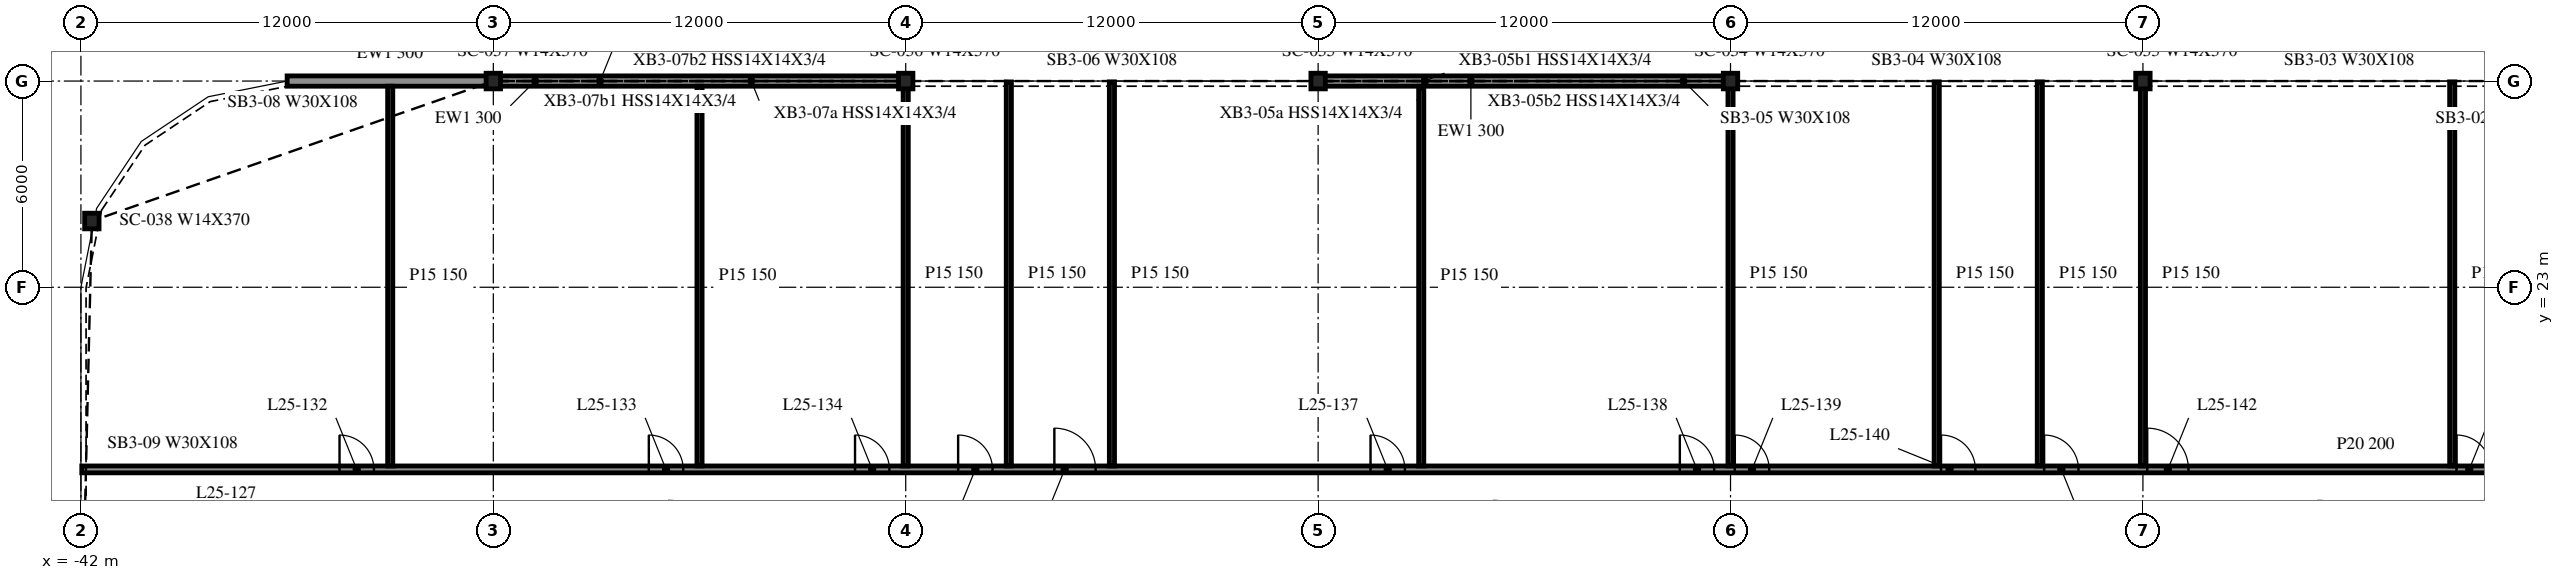
"""IFC4 building model, lengths in metres.
Left out: names, types, materials, properties, quantities, classifications, styles, units other than length and angle.
Written with IfcOpenShell. Run it as: python <this file> out.ifc"""

import sys

from ifc_helpers import new_model, si_unit, direction, frame, frame_2d, origin, origin_2d, place, context, subcontext, project, spatial, rectangle, i_section, extrude, element, fill, save


model = new_model("IFC4")
c1 = context("Model", 3, precision=1e-05, world=origin(), true_north=direction((0.0, 1.0)))
c2 = subcontext(c1, "Body", "Model", "MODEL_VIEW")
j1 = project(units=[si_unit("LENGTHUNIT", "METRE"), si_unit("PLANEANGLEUNIT", "RADIAN")], contexts=[c1])
p1 = place(None, origin())
s1 = spatial("IfcSite", under=j1, at=p1, CompositionType="ELEMENT")
p2 = place(p1, origin())
s2 = spatial("IfcBuilding", under=s1, at=p2, CompositionType="ELEMENT")
p3 = place(p2, frame((0.0, 0.0, 109.4)))
s3 = spatial("IfcBuildingStorey", under=s2, at=p3, CompositionType="ELEMENT", Elevation=109.4)
for number, where, z_axis, x_axis in (
    (1, (18.0, 29.0, -0.34), (0.0, 0.0, 1.0), (1.0, 0.0, 0.0)),
    (2, (6.0, 29.0, -0.34), (0.0, 0.0, 1.0), (1.0, 0.0, 0.0)),
    (3, (-6.0, 29.0, -0.34), (0.0, 0.0, 1.0), (1.0, 0.0, 0.0)),
    (4, (-18.0, 29.0, -0.34), (0.0, 0.0, 1.0), (1.0, 0.0, 0.0)),
    (5, (-30.0, 29.0, -0.34), (0.0, 0.0, 1.0), (1.0, 0.0, 0.0)),
    (6, (-41.682, 24.927, -0.34), (0.0, 0.0, 1.0), (1.0, 0.0, 0.0)),
):
    element("IfcColumn", number, at=place(p3, frame(where, z_axis=z_axis, x_axis=x_axis)), inside=s3, PredefinedType="COLUMN", context=c2, shape_type="SweptSolid", body=[
        extrude(i_section(OverallWidth=0.419, OverallDepth=0.455, WebThickness=0.042, FlangeThickness=0.068, at=origin_2d()), origin(), (0.0, 0.0, 1.0), 4.1),
    ])
for number, where, z_axis, x_axis in (
    (7, (5.979, 29.0, 0.0), (0.0, 0.0, 1.0), (-1.0, 0.0, 0.0)),
    (8, (-18.021, 29.0, 0.0), (0.0, 0.0, 1.0), (-1.0, 0.0, 0.0)),
):
    element("IfcWall", number, at=place(p3, frame(where, z_axis=z_axis, x_axis=x_axis)), inside=s3, PredefinedType="NOTDEFINED", context=c2, shape_type="SweptSolid", body=[
        extrude(rectangle(XDim=11.958, YDim=0.3, at=frame_2d((5.979, 0.0))), origin(), (0.0, 0.0, 1.0), 3.003),
    ])
p4 = place(p3, frame((-30.021, 29.0, 0.0), z_axis=(0.0, 0.0, 1.0), x_axis=(-1.0, 0.0, 0.0)))
e9 = element("IfcWall", 9, at=p4, inside=s3, PredefinedType="NOTDEFINED", context=c2, shape_type="SweptSolid", body=[
    extrude(rectangle(XDim=5.979, YDim=0.3, at=frame_2d((2.99, 0.0))), origin(), (0.0, 0.0, 1.0), 3.003),
])
p5 = place(p3, frame((-41.975, 17.7, 0.0), z_axis=(0.0, 0.0, 1.0), x_axis=(1.0, 0.0, 0.0)))
e10 = element("IfcWall", 10, at=p5, inside=s3, PredefinedType="PARTITIONING", context=c2, shape_type="SweptSolid", body=[
    extrude(rectangle(XDim=95.95, YDim=0.2, at=frame_2d((47.975, 0.0))), origin(), (0.0, 0.0, 1.0), 3.76),
])
p6 = place(p5, frame((7.5, 0.0, 0.0)))
e11 = element("IfcOpeningElement", 11, at=p6, cuts=e10, PredefinedType="OPENING", context=c2, shape_type="SweptSolid", body=[
    extrude(rectangle(XDim=1.0, YDim=2.1, at=frame_2d((0.5, 1.05))), frame((0.0, 0.11, 0.0), z_axis=(0.0, -1.0, 0.0), x_axis=(1.0, 0.0, 0.0)), (0.0, 0.0, 1.0), 0.22),
])
p7 = place(p5, frame((16.5, 0.0, 0.0)))
e12 = element("IfcOpeningElement", 12, at=p7, cuts=e10, PredefinedType="OPENING", context=c2, shape_type="SweptSolid", body=[
    extrude(rectangle(XDim=1.0, YDim=2.1, at=frame_2d((0.5, 1.05))), frame((0.0, 0.11, 0.0), z_axis=(0.0, -1.0, 0.0), x_axis=(1.0, 0.0, 0.0)), (0.0, 0.0, 1.0), 0.22),
])
p8 = place(p5, frame((22.5, 0.0, 0.0)))
e13 = element("IfcOpeningElement", 13, at=p8, cuts=e10, PredefinedType="OPENING", context=c2, shape_type="SweptSolid", body=[
    extrude(rectangle(XDim=1.0, YDim=2.1, at=frame_2d((0.5, 1.05))), frame((0.0, 0.11, 0.0), z_axis=(0.0, -1.0, 0.0), x_axis=(1.0, 0.0, 0.0)), (0.0, 0.0, 1.0), 0.22),
])
p9 = place(p5, frame((25.5, 0.0, 0.0)))
e14 = element("IfcOpeningElement", 14, at=p9, cuts=e10, PredefinedType="OPENING", context=c2, shape_type="SweptSolid", body=[
    extrude(rectangle(XDim=1.0, YDim=2.1, at=frame_2d((0.5, 1.05))), frame((0.0, 0.11, 0.0), z_axis=(0.0, -1.0, 0.0), x_axis=(1.0, 0.0, 0.0)), (0.0, 0.0, 1.0), 0.22),
])
p10 = place(p5, frame((28.3, 0.0, 0.0)))
e15 = element("IfcOpeningElement", 15, at=p10, cuts=e10, PredefinedType="OPENING", context=c2, shape_type="SweptSolid", body=[
    extrude(rectangle(XDim=1.2, YDim=2.1, at=frame_2d((0.6, 1.05))), frame((0.0, 0.11, 0.0), z_axis=(0.0, -1.0, 0.0), x_axis=(1.0, 0.0, 0.0)), (0.0, 0.0, 1.0), 0.22),
])
p11 = place(p5, frame((37.5, 0.0, 0.0)))
e16 = element("IfcOpeningElement", 16, at=p11, cuts=e10, PredefinedType="OPENING", context=c2, shape_type="SweptSolid", body=[
    extrude(rectangle(XDim=1.0, YDim=2.1, at=frame_2d((0.5, 1.05))), frame((0.0, 0.11, 0.0), z_axis=(0.0, -1.0, 0.0), x_axis=(1.0, 0.0, 0.0)), (0.0, 0.0, 1.0), 0.22),
])
p12 = place(p5, frame((46.5, 0.0, 0.0)))
e17 = element("IfcOpeningElement", 17, at=p12, cuts=e10, PredefinedType="OPENING", context=c2, shape_type="SweptSolid", body=[
    extrude(rectangle(XDim=1.0, YDim=2.1, at=frame_2d((0.5, 1.05))), frame((0.0, 0.11, 0.0), z_axis=(0.0, -1.0, 0.0), x_axis=(1.0, 0.0, 0.0)), (0.0, 0.0, 1.0), 0.22),
])
p13 = place(p5, frame((48.1, 0.0, 0.0)))
e18 = element("IfcOpeningElement", 18, at=p13, cuts=e10, PredefinedType="OPENING", context=c2, shape_type="SweptSolid", body=[
    extrude(rectangle(XDim=1.0, YDim=2.1, at=frame_2d((0.5, 1.05))), frame((0.0, 0.11, 0.0), z_axis=(0.0, -1.0, 0.0), x_axis=(1.0, 0.0, 0.0)), (0.0, 0.0, 1.0), 0.22),
])
p14 = place(p5, frame((54.1, 0.0, 0.0)))
e19 = element("IfcOpeningElement", 19, at=p14, cuts=e10, PredefinedType="OPENING", context=c2, shape_type="SweptSolid", body=[
    extrude(rectangle(XDim=1.0, YDim=2.1, at=frame_2d((0.5, 1.05))), frame((0.0, 0.11, 0.0), z_axis=(0.0, -1.0, 0.0), x_axis=(1.0, 0.0, 0.0)), (0.0, 0.0, 1.0), 0.22),
])
p15 = place(p5, frame((57.1, 0.0, 0.0)))
e20 = element("IfcOpeningElement", 20, at=p15, cuts=e10, PredefinedType="OPENING", context=c2, shape_type="SweptSolid", body=[
    extrude(rectangle(XDim=1.0, YDim=2.1, at=frame_2d((0.5, 1.05))), frame((0.0, 0.11, 0.0), z_axis=(0.0, -1.0, 0.0), x_axis=(1.0, 0.0, 0.0)), (0.0, 0.0, 1.0), 0.22),
])
p16 = place(p5, frame((60.1, 0.0, 0.0)))
e21 = element("IfcOpeningElement", 21, at=p16, cuts=e10, PredefinedType="OPENING", context=c2, shape_type="SweptSolid", body=[
    extrude(rectangle(XDim=1.2, YDim=2.1, at=frame_2d((0.6, 1.05))), frame((0.0, 0.11, 0.0), z_axis=(0.0, -1.0, 0.0), x_axis=(1.0, 0.0, 0.0)), (0.0, 0.0, 1.0), 0.22),
])
p17 = place(p5, frame((69.1, 0.0, 0.0)))
e22 = element("IfcOpeningElement", 22, at=p17, cuts=e10, PredefinedType="OPENING", context=c2, shape_type="SweptSolid", body=[
    extrude(rectangle(XDim=1.0, YDim=2.1, at=frame_2d((0.5, 1.05))), frame((0.0, 0.11, 0.0), z_axis=(0.0, -1.0, 0.0), x_axis=(1.0, 0.0, 0.0)), (0.0, 0.0, 1.0), 0.22),
])
p18 = place(p5, frame((78.1, 0.0, 0.0)))
e23 = element("IfcOpeningElement", 23, at=p18, cuts=e10, PredefinedType="OPENING", context=c2, shape_type="SweptSolid", body=[
    extrude(rectangle(XDim=1.0, YDim=2.1, at=frame_2d((0.5, 1.05))), frame((0.0, 0.11, 0.0), z_axis=(0.0, -1.0, 0.0), x_axis=(1.0, 0.0, 0.0)), (0.0, 0.0, 1.0), 0.22),
])
p19 = place(p5, frame((84.1, 0.0, 0.0)))
e24 = element("IfcOpeningElement", 24, at=p19, cuts=e10, PredefinedType="OPENING", context=c2, shape_type="SweptSolid", body=[
    extrude(rectangle(XDim=1.0, YDim=2.1, at=frame_2d((0.5, 1.05))), frame((0.0, 0.11, 0.0), z_axis=(0.0, -1.0, 0.0), x_axis=(1.0, 0.0, 0.0)), (0.0, 0.0, 1.0), 0.22),
])
p20 = place(p5, frame((87.1, 0.0, 0.0)))
e25 = element("IfcOpeningElement", 25, at=p20, cuts=e10, PredefinedType="OPENING", context=c2, shape_type="SweptSolid", body=[
    extrude(rectangle(XDim=1.0, YDim=2.1, at=frame_2d((0.5, 1.05))), frame((0.0, 0.11, 0.0), z_axis=(0.0, -1.0, 0.0), x_axis=(1.0, 0.0, 0.0)), (0.0, 0.0, 1.0), 0.22),
])
p21 = place(p5, frame((90.1, 0.0, 0.0)))
e26 = element("IfcOpeningElement", 26, at=p21, cuts=e10, PredefinedType="OPENING", context=c2, shape_type="SweptSolid", body=[
    extrude(rectangle(XDim=1.0, YDim=2.1, at=frame_2d((0.5, 1.05))), frame((0.0, 0.11, 0.0), z_axis=(0.0, -1.0, 0.0), x_axis=(1.0, 0.0, 0.0)), (0.0, 0.0, 1.0), 0.22),
])
for number, where, z_axis, x_axis in (
    (27, (-33.0, 17.8, 0.0), (0.0, 0.0, 1.0), (0.0, 1.0, 0.0)),
    (28, (-24.0, 17.8, 0.0), (0.0, 0.0, 1.0), (0.0, 1.0, 0.0)),
):
    element("IfcWall", number, at=place(p3, frame(where, z_axis=z_axis, x_axis=x_axis)), inside=s3, PredefinedType="PARTITIONING", context=c2, shape_type="SweptSolid", body=[
        extrude(rectangle(XDim=11.05, YDim=0.15, at=frame_2d((5.525, 0.0))), origin(), (0.0, 0.0, 1.0), 3.76),
    ])
for number, where, z_axis, x_axis in (
    (29, (-18.0, 17.8, 0.0), (0.0, 0.0, 1.0), (0.0, 1.0, 0.0)),
    (30, (-15.0, 17.8, 0.0), (0.0, 0.0, 1.0), (0.0, 1.0, 0.0)),
    (31, (-12.0, 17.8, 0.0), (0.0, 0.0, 1.0), (0.0, 1.0, 0.0)),
):
    element("IfcWall", number, at=place(p3, frame(where, z_axis=z_axis, x_axis=x_axis)), inside=s3, PredefinedType="PARTITIONING", context=c2, shape_type="SweptSolid", body=[
        extrude(rectangle(XDim=11.175, YDim=0.15, at=frame_2d((5.587, 0.0))), origin(), (0.0, 0.0, 1.0), 3.76),
    ])
p22 = place(p3, frame((-3.0, 17.8, 0.0), z_axis=(0.0, 0.0, 1.0), x_axis=(0.0, 1.0, 0.0)))
e32 = element("IfcWall", 32, at=p22, inside=s3, PredefinedType="PARTITIONING", context=c2, shape_type="SweptSolid", body=[
    extrude(rectangle(XDim=11.05, YDim=0.15, at=frame_2d((5.525, 0.0))), origin(), (0.0, 0.0, 1.0), 3.76),
])
for number, where, z_axis, x_axis in (
    (33, (6.0, 17.8, 0.0), (0.0, 0.0, 1.0), (0.0, 1.0, 0.0)),
    (34, (12.0, 17.8, 0.0), (0.0, 0.0, 1.0), (0.0, 1.0, 0.0)),
    (35, (15.0, 17.8, 0.0), (0.0, 0.0, 1.0), (0.0, 1.0, 0.0)),
    (36, (18.0, 17.8, 0.0), (0.0, 0.0, 1.0), (0.0, 1.0, 0.0)),
    (37, (27.0, 17.8, 0.0), (0.0, 0.0, 1.0), (0.0, 1.0, 0.0)),
):
    element("IfcWall", number, at=place(p3, frame(where, z_axis=z_axis, x_axis=x_axis)), inside=s3, PredefinedType="PARTITIONING", context=c2, shape_type="SweptSolid", body=[
        extrude(rectangle(XDim=11.175, YDim=0.15, at=frame_2d((5.587, 0.0))), origin(), (0.0, 0.0, 1.0), 3.76),
    ])
p23 = place(p6, origin())
e38 = element("IfcDoor", 38, at=p23, inside=s3, OperationType="SINGLE_SWING_LEFT", PredefinedType="DOOR", context=c2, shape_type="SweptSolid", body=[
    extrude(rectangle(XDim=1.0, YDim=2.1, at=frame_2d((0.5, 1.05))), frame((0.0, 0.025, 0.0), z_axis=(0.0, -1.0, 0.0), x_axis=(1.0, 0.0, 0.0)), (0.0, 0.0, 1.0), 0.05),
])
fill(e11, e38)
p24 = place(p7, origin())
e39 = element("IfcDoor", 39, at=p24, inside=s3, OperationType="SINGLE_SWING_LEFT", PredefinedType="DOOR", context=c2, shape_type="SweptSolid", body=[
    extrude(rectangle(XDim=1.0, YDim=2.1, at=frame_2d((0.5, 1.05))), frame((0.0, 0.025, 0.0), z_axis=(0.0, -1.0, 0.0), x_axis=(1.0, 0.0, 0.0)), (0.0, 0.0, 1.0), 0.05),
])
fill(e12, e39)
p25 = place(p8, origin())
e40 = element("IfcDoor", 40, at=p25, inside=s3, OperationType="SINGLE_SWING_LEFT", PredefinedType="DOOR", context=c2, shape_type="SweptSolid", body=[
    extrude(rectangle(XDim=1.0, YDim=2.1, at=frame_2d((0.5, 1.05))), frame((0.0, 0.025, 0.0), z_axis=(0.0, -1.0, 0.0), x_axis=(1.0, 0.0, 0.0)), (0.0, 0.0, 1.0), 0.05),
])
fill(e13, e40)
p26 = place(p9, origin())
e41 = element("IfcDoor", 41, at=p26, inside=s3, OperationType="SINGLE_SWING_LEFT", PredefinedType="DOOR", context=c2, shape_type="SweptSolid", body=[
    extrude(rectangle(XDim=1.0, YDim=2.1, at=frame_2d((0.5, 1.05))), frame((0.0, 0.025, 0.0), z_axis=(0.0, -1.0, 0.0), x_axis=(1.0, 0.0, 0.0)), (0.0, 0.0, 1.0), 0.05),
])
fill(e14, e41)
p27 = place(p10, origin())
e42 = element("IfcDoor", 42, at=p27, inside=s3, OperationType="SINGLE_SWING_LEFT", PredefinedType="DOOR", context=c2, shape_type="SweptSolid", body=[
    extrude(rectangle(XDim=1.2, YDim=2.1, at=frame_2d((0.6, 1.05))), frame((0.0, 0.025, 0.0), z_axis=(0.0, -1.0, 0.0), x_axis=(1.0, 0.0, 0.0)), (0.0, 0.0, 1.0), 0.05),
])
fill(e15, e42)
p28 = place(p11, origin())
e43 = element("IfcDoor", 43, at=p28, inside=s3, OperationType="SINGLE_SWING_LEFT", PredefinedType="DOOR", context=c2, shape_type="SweptSolid", body=[
    extrude(rectangle(XDim=1.0, YDim=2.1, at=frame_2d((0.5, 1.05))), frame((0.0, 0.025, 0.0), z_axis=(0.0, -1.0, 0.0), x_axis=(1.0, 0.0, 0.0)), (0.0, 0.0, 1.0), 0.05),
])
fill(e16, e43)
p29 = place(p12, origin())
e44 = element("IfcDoor", 44, at=p29, inside=s3, OperationType="SINGLE_SWING_LEFT", PredefinedType="DOOR", context=c2, shape_type="SweptSolid", body=[
    extrude(rectangle(XDim=1.0, YDim=2.1, at=frame_2d((0.5, 1.05))), frame((0.0, 0.025, 0.0), z_axis=(0.0, -1.0, 0.0), x_axis=(1.0, 0.0, 0.0)), (0.0, 0.0, 1.0), 0.05),
])
fill(e17, e44)
p30 = place(p13, origin())
e45 = element("IfcDoor", 45, at=p30, inside=s3, OperationType="SINGLE_SWING_RIGHT", PredefinedType="DOOR", context=c2, shape_type="SweptSolid", body=[
    extrude(rectangle(XDim=1.0, YDim=2.1, at=frame_2d((0.5, 1.05))), frame((0.0, 0.025, 0.0), z_axis=(0.0, -1.0, 0.0), x_axis=(1.0, 0.0, 0.0)), (0.0, 0.0, 1.0), 0.05),
])
fill(e18, e45)
p31 = place(p14, origin())
e46 = element("IfcDoor", 46, at=p31, inside=s3, OperationType="SINGLE_SWING_RIGHT", PredefinedType="DOOR", context=c2, shape_type="SweptSolid", body=[
    extrude(rectangle(XDim=1.0, YDim=2.1, at=frame_2d((0.5, 1.05))), frame((0.0, 0.025, 0.0), z_axis=(0.0, -1.0, 0.0), x_axis=(1.0, 0.0, 0.0)), (0.0, 0.0, 1.0), 0.05),
])
fill(e19, e46)
p32 = place(p15, origin())
e47 = element("IfcDoor", 47, at=p32, inside=s3, OperationType="SINGLE_SWING_RIGHT", PredefinedType="DOOR", context=c2, shape_type="SweptSolid", body=[
    extrude(rectangle(XDim=1.0, YDim=2.1, at=frame_2d((0.5, 1.05))), frame((0.0, 0.025, 0.0), z_axis=(0.0, -1.0, 0.0), x_axis=(1.0, 0.0, 0.0)), (0.0, 0.0, 1.0), 0.05),
])
fill(e20, e47)
p33 = place(p16, origin())
e48 = element("IfcDoor", 48, at=p33, inside=s3, OperationType="SINGLE_SWING_RIGHT", PredefinedType="DOOR", context=c2, shape_type="SweptSolid", body=[
    extrude(rectangle(XDim=1.2, YDim=2.1, at=frame_2d((0.6, 1.05))), frame((0.0, 0.025, 0.0), z_axis=(0.0, -1.0, 0.0), x_axis=(1.0, 0.0, 0.0)), (0.0, 0.0, 1.0), 0.05),
])
fill(e21, e48)
p34 = place(p17, origin())
e49 = element("IfcDoor", 49, at=p34, inside=s3, OperationType="SINGLE_SWING_RIGHT", PredefinedType="DOOR", context=c2, shape_type="SweptSolid", body=[
    extrude(rectangle(XDim=1.0, YDim=2.1, at=frame_2d((0.5, 1.05))), frame((0.0, 0.025, 0.0), z_axis=(0.0, -1.0, 0.0), x_axis=(1.0, 0.0, 0.0)), (0.0, 0.0, 1.0), 0.05),
])
fill(e22, e49)
save(model, sys.argv[1])
